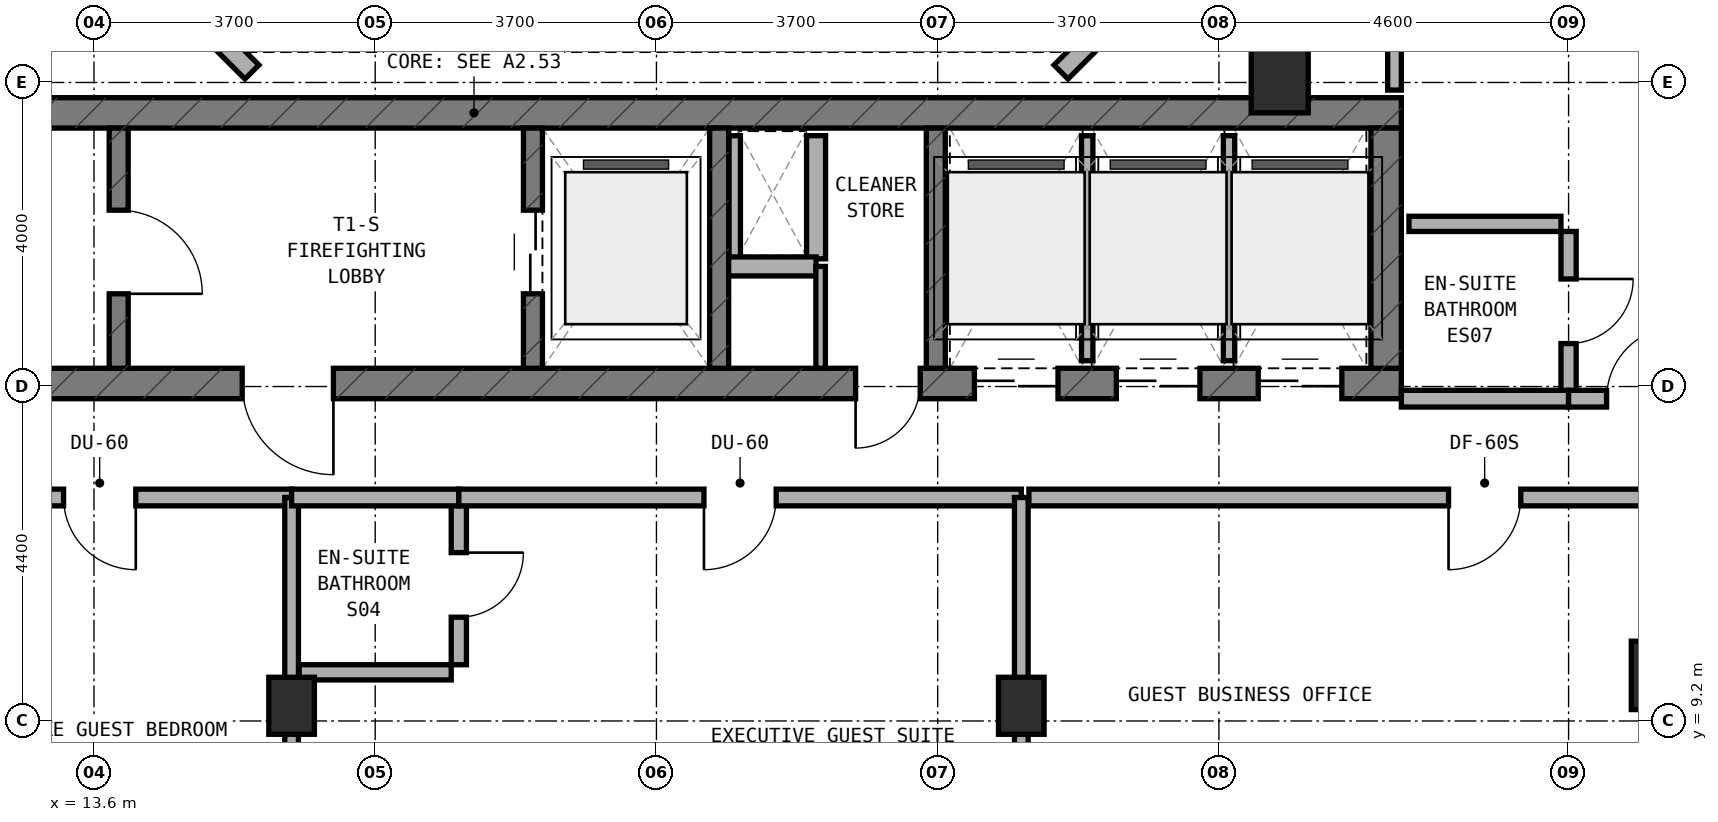
"""IFC4 building model, lengths in metres.
Left out: names, types, materials, properties, quantities, classifications, styles, units other than length and angle.
Written with IfcOpenShell. Run it as: python <this file> out.ifc"""

import sys

from ifc_helpers import new_model, si_unit, direction, frame, frame_2d, origin, origin_2d, place, context, subcontext, project, spatial, rectangle, extrude, element, fill, save


model = new_model("IFC4")
c1 = context("Model", 3, precision=1e-05, world=origin(), true_north=direction((0.0, 1.0)))
c2 = subcontext(c1, "Body", "Model", "MODEL_VIEW")
j1 = project(units=[si_unit("LENGTHUNIT", "METRE"), si_unit("PLANEANGLEUNIT", "RADIAN")], contexts=[c1])
p1 = place(None, origin())
s1 = spatial("IfcSite", under=j1, at=p1, CompositionType="ELEMENT")
p2 = place(p1, origin())
s2 = spatial("IfcBuilding", under=s1, at=p2, CompositionType="ELEMENT")
p3 = place(p2, frame((0.0, 0.0, 246.8)))
s3 = spatial("IfcBuildingStorey", under=s2, at=p3, CompositionType="ELEMENT", Elevation=246.8)
p4 = place(p3, frame((6.4, 13.64, 0.0), z_axis=(0.0, 0.0, 1.0), x_axis=(1.0, 0.0, 0.0)))
e1 = element("IfcWall", 1, at=p4, inside=s3, PredefinedType="SHEAR", context=c2, shape_type="SweptSolid", body=[
    extrude(rectangle(XDim=24.4, YDim=0.4, at=frame_2d((12.2, 0.0))), origin(), (0.0, 0.0, 1.0), 3.6),
])
p5 = place(p4, frame((9.15, 0.0, 0.0)))
e2 = element("IfcOpeningElement", 2, at=p5, cuts=e1, PredefinedType="OPENING", context=c2, shape_type="SweptSolid", body=[
    extrude(rectangle(XDim=1.2, YDim=2.15, at=frame_2d((0.6, 1.075))), frame((0.0, 0.21, 0.0), z_axis=(0.0, -1.0, 0.0), x_axis=(1.0, 0.0, 0.0)), (0.0, 0.0, 1.0), 0.42),
])
p6 = place(p4, frame((17.22, 0.0, 0.0)))
e3 = element("IfcOpeningElement", 3, at=p6, cuts=e1, PredefinedType="OPENING", context=c2, shape_type="SweptSolid", body=[
    extrude(rectangle(XDim=0.85, YDim=2.1, at=frame_2d((0.425, 1.05))), frame((0.0, 0.21, 0.0), z_axis=(0.0, -1.0, 0.0), x_axis=(1.0, 0.0, 0.0)), (0.0, 0.0, 1.0), 0.42),
])
p7 = place(p4, frame((18.783, 0.0, 0.0)))
e4 = element("IfcOpeningElement", 4, at=p7, cuts=e1, PredefinedType="OPENING", context=c2, shape_type="SweptSolid", body=[
    extrude(rectangle(XDim=1.1, YDim=2.15, at=frame_2d((0.55, 1.075))), frame((0.0, 0.21, 0.0), z_axis=(0.0, -1.0, 0.0), x_axis=(1.0, 0.0, 0.0)), (0.0, 0.0, 1.0), 0.42),
])
p8 = place(p4, frame((20.65, 0.0, 0.0)))
e5 = element("IfcOpeningElement", 5, at=p8, cuts=e1, PredefinedType="OPENING", context=c2, shape_type="SweptSolid", body=[
    extrude(rectangle(XDim=1.1, YDim=2.15, at=frame_2d((0.55, 1.075))), frame((0.0, 0.21, 0.0), z_axis=(0.0, -1.0, 0.0), x_axis=(1.0, 0.0, 0.0)), (0.0, 0.0, 1.0), 0.42),
])
p9 = place(p4, frame((22.517, 0.0, 0.0)))
e6 = element("IfcOpeningElement", 6, at=p9, cuts=e1, PredefinedType="OPENING", context=c2, shape_type="SweptSolid", body=[
    extrude(rectangle(XDim=1.1, YDim=2.15, at=frame_2d((0.55, 1.075))), frame((0.0, 0.21, 0.0), z_axis=(0.0, -1.0, 0.0), x_axis=(1.0, 0.0, 0.0)), (0.0, 0.0, 1.0), 0.42),
])
p10 = place(p3, frame((6.4, 17.2, 0.0), z_axis=(0.0, 0.0, 1.0), x_axis=(1.0, 0.0, 0.0)))
e7 = element("IfcWall", 7, at=p10, inside=s3, PredefinedType="SHEAR", context=c2, shape_type="SweptSolid", body=[
    extrude(rectangle(XDim=24.4, YDim=0.4, at=frame_2d((12.2, 0.0))), origin(), (0.0, 0.0, 1.0), 3.6),
])
p11 = place(p3, frame((30.6, 13.84, 0.0), z_axis=(0.0, 0.0, 1.0), x_axis=(0.0, 1.0, 0.0)))
e8 = element("IfcWall", 8, at=p11, inside=s3, PredefinedType="SHEAR", context=c2, shape_type="SweptSolid", body=[
    extrude(rectangle(XDim=3.16, YDim=0.4, at=frame_2d((1.58, 0.0))), origin(), (0.0, 0.0, 1.0), 3.6),
])
p12 = place(p3, frame((13.925, 13.84, 0.0), z_axis=(0.0, 0.0, 1.0), x_axis=(0.0, 1.0, 0.0)))
e9 = element("IfcWall", 9, at=p12, inside=s3, PredefinedType="STANDARD", context=c2, shape_type="SweptSolid", body=[
    extrude(rectangle(XDim=3.16, YDim=0.25, at=frame_2d((1.58, 0.0))), origin(), (0.0, 0.0, 1.0), 3.32),
])
p13 = place(p12, frame((0.98, 0.0, 0.0)))
e10 = element("IfcOpeningElement", 10, at=p13, cuts=e9, PredefinedType="OPENING", context=c2, shape_type="SweptSolid", body=[
    extrude(rectangle(XDim=1.1, YDim=2.15, at=frame_2d((0.55, 1.075))), frame((0.0, 0.135, 0.0), z_axis=(0.0, -1.0, 0.0), x_axis=(1.0, 0.0, 0.0)), (0.0, 0.0, 1.0), 0.27),
])
p14 = place(p3, frame((19.375, 13.84, 0.0), z_axis=(0.0, 0.0, 1.0), x_axis=(0.0, 1.0, 0.0)))
e11 = element("IfcWall", 11, at=p14, inside=s3, PredefinedType="STANDARD", context=c2, shape_type="SweptSolid", body=[
    extrude(rectangle(XDim=3.16, YDim=0.25, at=frame_2d((1.58, 0.0))), origin(), (0.0, 0.0, 1.0), 3.32),
])
p15 = place(p14, frame((0.98, 0.0, 0.0)))
e12 = element("IfcOpeningElement", 12, at=p15, cuts=e11, PredefinedType="OPENING", context=c2, shape_type="SweptSolid", body=[
    extrude(rectangle(XDim=1.1, YDim=2.15, at=frame_2d((0.55, 1.075))), frame((0.0, 0.135, 0.0), z_axis=(0.0, -1.0, 0.0), x_axis=(1.0, 0.0, 0.0)), (0.0, 0.0, 1.0), 0.27),
])
for number, where, z_axis, x_axis in (
    (13, (21.825, 13.84, 0.0), (0.0, 0.0, 1.0), (0.0, 1.0, 0.0)),
    (14, (24.675, 13.84, 0.0), (0.0, 0.0, 1.0), (0.0, 1.0, 0.0)),
):
    element("IfcWall", number, at=place(p3, frame(where, z_axis=z_axis, x_axis=x_axis)), inside=s3, PredefinedType="STANDARD", context=c2, shape_type="SweptSolid", body=[
        extrude(rectangle(XDim=3.16, YDim=0.25, at=frame_2d((1.58, 0.0))), origin(), (0.0, 0.0, 1.0), 3.32),
    ])
for number, where, z_axis, x_axis in (
    (15, (16.2, 9.4, 0.0), (0.0, 0.0, 1.0), (1.0, 0.0, 0.0)),
    (16, (25.8, 9.4, 0.0), (0.0, 0.0, 1.0), (1.0, 0.0, 0.0)),
):
    element("IfcColumn", number, at=place(p3, frame(where, z_axis=z_axis, x_axis=x_axis)), inside=s3, PredefinedType="COLUMN", context=c2, shape_type="SweptSolid", body=[
        extrude(rectangle(XDim=0.6, YDim=0.75, at=origin_2d()), origin(), (0.0, 0.0, 1.0), 3.6),
    ])
for number, where, z_axis, x_axis in (
    (17, (34.2, 9.8, 0.0), (0.0, 0.0, 1.0), (1.0, 0.0, 0.0)),
    (18, (29.2, 17.65, 0.0), (0.0, 0.0, 1.0), (1.0, 0.0, 0.0)),
):
    element("IfcColumn", number, at=place(p3, frame(where, z_axis=z_axis, x_axis=x_axis)), inside=s3, PredefinedType="COLUMN", context=c2, shape_type="SweptSolid", body=[
        extrude(rectangle(XDim=0.75, YDim=0.9, at=origin_2d()), origin(), (0.0, 0.0, 1.0), 3.6),
    ])
for number, where, z_axis, x_axis in (
    (19, (26.322, 17.738, 0.0), (0.0, 0.0, 1.0), (0.707, 0.707, 0.0)),
    (20, (13.844, 19.572, 0.0), (0.0, 0.0, 1.0), (0.707, -0.707, 0.0)),
):
    element("IfcWall", number, at=place(p3, frame(where, z_axis=z_axis, x_axis=x_axis)), inside=s3, PredefinedType="STANDARD", context=c2, shape_type="SweptSolid", body=[
        extrude(rectangle(XDim=2.594, YDim=0.26, at=frame_2d((1.297, 0.0))), origin(), (0.0, 0.0, 1.0), 3.32),
    ])
p16 = place(p3, frame((22.03, 15.28, 0.0), z_axis=(0.0, 0.0, 1.0), x_axis=(0.0, 1.0, 0.0)))
e21 = element("IfcWall", 21, at=p16, inside=s3, PredefinedType="PARTITIONING", context=c2, shape_type="SweptSolid", body=[
    extrude(rectangle(XDim=1.62, YDim=0.15, at=frame_2d((0.81, 0.0))), origin(), (0.0, 0.0, 1.0), 3.32),
])
p17 = place(p3, frame((23.1, 15.28, 0.0), z_axis=(0.0, 0.0, 1.0), x_axis=(0.0, 1.0, 0.0)))
e22 = element("IfcWall", 22, at=p17, inside=s3, PredefinedType="SOLIDWALL", context=c2, shape_type="SweptSolid", body=[
    extrude(rectangle(XDim=1.62, YDim=0.25, at=frame_2d((0.81, 0.0))), origin(), (0.0, 0.0, 1.0), 3.32),
])
p18 = place(p3, frame((21.95, 15.18, 0.0), z_axis=(0.0, 0.0, 1.0), x_axis=(1.0, 0.0, 0.0)))
e23 = element("IfcWall", 23, at=p18, inside=s3, PredefinedType="SOLIDWALL", context=c2, shape_type="SweptSolid", body=[
    extrude(rectangle(XDim=1.15, YDim=0.25, at=frame_2d((0.575, 0.0))), origin(), (0.0, 0.0, 1.0), 3.32),
])
p19 = place(p3, frame((23.16, 13.84, 0.0), z_axis=(0.0, 0.0, 1.0), x_axis=(0.0, 1.0, 0.0)))
e24 = element("IfcWall", 24, at=p19, inside=s3, PredefinedType="PARTITIONING", context=c2, shape_type="SweptSolid", body=[
    extrude(rectangle(XDim=1.34, YDim=0.125, at=frame_2d((0.67, 0.0))), origin(), (0.0, 0.0, 1.0), 3.32),
])
p20 = place(p3, frame((26.667, 13.94, 0.0), z_axis=(0.0, 0.0, 1.0), x_axis=(0.0, 1.0, 0.0)))
e25 = element("IfcWall", 25, at=p20, inside=s3, PredefinedType="PARTITIONING", context=c2, shape_type="SweptSolid", body=[
    extrude(rectangle(XDim=2.96, YDim=0.15, at=frame_2d((1.48, 0.0))), origin(), (0.0, 0.0, 1.0), 3.32),
])
p21 = place(p3, frame((28.533, 13.94, 0.0), z_axis=(0.0, 0.0, 1.0), x_axis=(0.0, 1.0, 0.0)))
e26 = element("IfcWall", 26, at=p21, inside=s3, PredefinedType="PARTITIONING", context=c2, shape_type="SweptSolid", body=[
    extrude(rectangle(XDim=2.96, YDim=0.15, at=frame_2d((1.48, 0.0))), origin(), (0.0, 0.0, 1.0), 2.745),
])
p22 = place(p3, frame((11.15, 12.14, 0.0), z_axis=(0.0, 0.0, 1.0), x_axis=(1.0, 0.0, 0.0)))
e27 = element("IfcWall", 27, at=p22, inside=s3, PredefinedType="SOLIDWALL", context=c2, shape_type="SweptSolid", body=[
    extrude(rectangle(XDim=5.05, YDim=0.22, at=frame_2d((2.525, 0.0))), origin(), (0.0, 0.0, 1.0), 2.745),
])
p23 = place(p22, frame((2.05, 0.0, 0.0)))
e28 = element("IfcOpeningElement", 28, at=p23, cuts=e27, PredefinedType="OPENING", context=c2, shape_type="SweptSolid", body=[
    extrude(rectangle(XDim=0.95, YDim=2.1, at=frame_2d((0.475, 1.05))), frame((0.0, 0.12, 0.0), z_axis=(0.0, -1.0, 0.0), x_axis=(1.0, 0.0, 0.0)), (0.0, 0.0, 1.0), 0.24),
])
p24 = place(p3, frame((16.2, 6.46, 0.0), z_axis=(0.0, 0.0, 1.0), x_axis=(0.0, 1.0, 0.0)))
e29 = element("IfcWall", 29, at=p24, inside=s3, PredefinedType="SOLIDWALL", context=c2, shape_type="SweptSolid", body=[
    extrude(rectangle(XDim=5.68, YDim=0.18, at=frame_2d((2.84, 0.0))), origin(), (0.0, 0.0, 1.0), 2.745),
])
p25 = place(p3, frame((18.4, 9.94, 0.0), z_axis=(0.0, 0.0, 1.0), x_axis=(0.0, 1.0, 0.0)))
e30 = element("IfcWall", 30, at=p25, inside=s3, PredefinedType="PLUMBINGWALL", context=c2, shape_type="SweptSolid", body=[
    extrude(rectangle(XDim=2.1, YDim=0.2, at=frame_2d((1.05, 0.0))), origin(), (0.0, 0.0, 1.0), 3.025),
])
p26 = place(p25, frame((0.625, 0.0, 0.0)))
e31 = element("IfcOpeningElement", 31, at=p26, cuts=e30, PredefinedType="OPENING", context=c2, shape_type="SweptSolid", body=[
    extrude(rectangle(XDim=0.85, YDim=2.1, at=frame_2d((0.425, 1.05))), frame((0.0, 0.11, 0.0), z_axis=(0.0, -1.0, 0.0), x_axis=(1.0, 0.0, 0.0)), (0.0, 0.0, 1.0), 0.22),
])
p27 = place(p3, frame((16.3, 9.84, 0.0), z_axis=(0.0, 0.0, 1.0), x_axis=(1.0, 0.0, 0.0)))
e32 = element("IfcWall", 32, at=p27, inside=s3, PredefinedType="PLUMBINGWALL", context=c2, shape_type="SweptSolid", body=[
    extrude(rectangle(XDim=2.0, YDim=0.2, at=frame_2d((1.0, 0.0))), origin(), (0.0, 0.0, 1.0), 3.32),
])
p28 = place(p3, frame((16.2, 12.14, 0.0), z_axis=(0.0, 0.0, 1.0), x_axis=(1.0, 0.0, 0.0)))
e33 = element("IfcWall", 33, at=p28, inside=s3, PredefinedType="SOLIDWALL", context=c2, shape_type="SweptSolid", body=[
    extrude(rectangle(XDim=2.2, YDim=0.22, at=frame_2d((1.1, 0.0))), origin(), (0.0, 0.0, 1.0), 2.745),
])
p29 = place(p3, frame((18.4, 12.14, 0.0), z_axis=(0.0, 0.0, 1.0), x_axis=(1.0, 0.0, 0.0)))
e34 = element("IfcWall", 34, at=p29, inside=s3, PredefinedType="SOLIDWALL", context=c2, shape_type="SweptSolid", body=[
    extrude(rectangle(XDim=7.4, YDim=0.22, at=frame_2d((3.7, 0.0))), origin(), (0.0, 0.0, 1.0), 2.745),
])
p30 = place(p29, frame((3.225, 0.0, 0.0)))
e35 = element("IfcOpeningElement", 35, at=p30, cuts=e34, PredefinedType="OPENING", context=c2, shape_type="SweptSolid", body=[
    extrude(rectangle(XDim=0.95, YDim=2.1, at=frame_2d((0.475, 1.05))), frame((0.0, 0.12, 0.0), z_axis=(0.0, -1.0, 0.0), x_axis=(1.0, 0.0, 0.0)), (0.0, 0.0, 1.0), 0.24),
])
p31 = place(p3, frame((25.8, 6.46, 0.0), z_axis=(0.0, 0.0, 1.0), x_axis=(0.0, 1.0, 0.0)))
e36 = element("IfcWall", 36, at=p31, inside=s3, PredefinedType="SOLIDWALL", context=c2, shape_type="SweptSolid", body=[
    extrude(rectangle(XDim=5.68, YDim=0.18, at=frame_2d((2.84, 0.0))), origin(), (0.0, 0.0, 1.0), 2.745),
])
p32 = place(p3, frame((25.9, 12.14, 0.0), z_axis=(0.0, 0.0, 1.0), x_axis=(1.0, 0.0, 0.0)))
e37 = element("IfcWall", 37, at=p32, inside=s3, PredefinedType="SOLIDWALL", context=c2, shape_type="SweptSolid", body=[
    extrude(rectangle(XDim=13.24, YDim=0.22, at=frame_2d((6.62, 0.0))), origin(), (0.0, 0.0, 1.0), 2.745),
])
p33 = place(p32, frame((5.521, 0.0, 0.0)))
e38 = element("IfcOpeningElement", 38, at=p33, cuts=e37, PredefinedType="OPENING", context=c2, shape_type="SweptSolid", body=[
    extrude(rectangle(XDim=0.95, YDim=2.1, at=frame_2d((0.475, 1.05))), frame((0.0, 0.12, 0.0), z_axis=(0.0, -1.0, 0.0), x_axis=(1.0, 0.0, 0.0)), (0.0, 0.0, 1.0), 0.24),
])
p34 = place(p3, frame((30.71, 17.5, 0.0), z_axis=(0.0, 0.0, 1.0), x_axis=(0.0, 1.0, 0.0)))
e39 = element("IfcWall", 39, at=p34, inside=s3, PredefinedType="SOLIDWALL", context=c2, shape_type="SweptSolid", body=[
    extrude(rectangle(XDim=15.0, YDim=0.18, at=frame_2d((7.5, 0.0))), origin(), (0.0, 0.0, 1.0), 2.745),
])
p35 = place(p3, frame((33.0, 13.54, 0.0), z_axis=(0.0, 0.0, 1.0), x_axis=(0.0, 1.0, 0.0)))
e40 = element("IfcWall", 40, at=p35, inside=s3, PredefinedType="PLUMBINGWALL", context=c2, shape_type="SweptSolid", body=[
    extrude(rectangle(XDim=2.1, YDim=0.2, at=frame_2d((1.05, 0.0))), origin(), (0.0, 0.0, 1.0), 3.32),
])
p36 = place(p35, frame((0.625, 0.0, 0.0)))
e41 = element("IfcOpeningElement", 41, at=p36, cuts=e40, PredefinedType="OPENING", context=c2, shape_type="SweptSolid", body=[
    extrude(rectangle(XDim=0.85, YDim=2.1, at=frame_2d((0.425, 1.05))), frame((0.0, 0.11, 0.0), z_axis=(0.0, -1.0, 0.0), x_axis=(1.0, 0.0, 0.0)), (0.0, 0.0, 1.0), 0.22),
])
p37 = place(p3, frame((30.9, 15.74, 0.0), z_axis=(0.0, 0.0, 1.0), x_axis=(1.0, 0.0, 0.0)))
e42 = element("IfcWall", 42, at=p37, inside=s3, PredefinedType="PLUMBINGWALL", context=c2, shape_type="SweptSolid", body=[
    extrude(rectangle(XDim=2.0, YDim=0.2, at=frame_2d((1.0, 0.0))), origin(), (0.0, 0.0, 1.0), 3.32),
])
p38 = place(p3, frame((30.8, 13.44, 0.0), z_axis=(0.0, 0.0, 1.0), x_axis=(1.0, 0.0, 0.0)))
e43 = element("IfcWall", 43, at=p38, inside=s3, PredefinedType="SOLIDWALL", context=c2, shape_type="SweptSolid", body=[
    extrude(rectangle(XDim=2.2, YDim=0.22, at=frame_2d((1.1, 0.0))), origin(), (0.0, 0.0, 1.0), 3.32),
])
p39 = place(p3, frame((33.0, 13.44, 0.0), z_axis=(0.0, 0.0, 1.0), x_axis=(1.0, 0.0, 0.0)))
e44 = element("IfcWall", 44, at=p39, inside=s3, PredefinedType="SOLIDWALL", context=c2, shape_type="SweptSolid", body=[
    extrude(rectangle(XDim=6.4, YDim=0.22, at=frame_2d((3.2, 0.0))), origin(), (0.0, 0.0, 1.0), 2.745),
])
p40 = place(p39, frame((0.5, 0.0, 0.0)))
e45 = element("IfcOpeningElement", 45, at=p40, cuts=e44, PredefinedType="OPENING", context=c2, shape_type="SweptSolid", body=[
    extrude(rectangle(XDim=0.95, YDim=2.1, at=frame_2d((0.475, 1.05))), frame((0.0, 0.12, 0.0), z_axis=(0.0, -1.0, 0.0), x_axis=(1.0, 0.0, 0.0)), (0.0, 0.0, 1.0), 0.24),
])
p41 = place(p13, frame((1.1, 0.0, 0.0), z_axis=(0.0, 0.0, 1.0), x_axis=(-1.0, 0.0, 0.0)))
e46 = element("IfcDoor", 46, at=p41, inside=s3, OperationType="SINGLE_SWING_RIGHT", PredefinedType="DOOR", context=c2, shape_type="SweptSolid", body=[
    extrude(rectangle(XDim=1.1, YDim=2.15, at=frame_2d((0.55, 1.075))), frame((0.0, 0.025, 0.0), z_axis=(0.0, -1.0, 0.0), x_axis=(1.0, 0.0, 0.0)), (0.0, 0.0, 1.0), 0.05),
])
fill(e10, e46)
p42 = place(p5, frame((1.2, 0.0, 0.0), z_axis=(0.0, 0.0, 1.0), x_axis=(-1.0, 0.0, 0.0)))
e47 = element("IfcDoor", 47, at=p42, inside=s3, OperationType="SINGLE_SWING_LEFT", PredefinedType="DOOR", context=c2, shape_type="SweptSolid", body=[
    extrude(rectangle(XDim=1.2, YDim=2.15, at=frame_2d((0.6, 1.075))), frame((0.0, 0.025, 0.0), z_axis=(0.0, -1.0, 0.0), x_axis=(1.0, 0.0, 0.0)), (0.0, 0.0, 1.0), 0.05),
])
fill(e2, e47)
p43 = place(p15, origin())
e48 = element("IfcDoor", 48, at=p43, inside=s3, OperationType="DOUBLE_DOOR_SLIDING", PredefinedType="DOOR", context=c2, shape_type="SweptSolid", body=[
    extrude(rectangle(XDim=1.1, YDim=2.15, at=frame_2d((0.55, 1.075))), frame((0.0, 0.025, 0.0), z_axis=(0.0, -1.0, 0.0), x_axis=(1.0, 0.0, 0.0)), (0.0, 0.0, 1.0), 0.05),
])
fill(e12, e48)
p44 = place(p6, frame((0.85, 0.0, 0.0), z_axis=(0.0, 0.0, 1.0), x_axis=(-1.0, 0.0, 0.0)))
e49 = element("IfcDoor", 49, at=p44, inside=s3, OperationType="SINGLE_SWING_RIGHT", PredefinedType="DOOR", context=c2, shape_type="SweptSolid", body=[
    extrude(rectangle(XDim=0.85, YDim=2.1, at=frame_2d((0.425, 1.05))), frame((0.0, 0.025, 0.0), z_axis=(0.0, -1.0, 0.0), x_axis=(1.0, 0.0, 0.0)), (0.0, 0.0, 1.0), 0.05),
])
fill(e3, e49)
p45 = place(p7, frame((1.1, 0.0, 0.0), z_axis=(0.0, 0.0, 1.0), x_axis=(-1.0, 0.0, 0.0)))
e50 = element("IfcDoor", 50, at=p45, inside=s3, OperationType="DOUBLE_DOOR_SLIDING", PredefinedType="DOOR", context=c2, shape_type="SweptSolid", body=[
    extrude(rectangle(XDim=1.1, YDim=2.15, at=frame_2d((0.55, 1.075))), frame((0.0, 0.025, 0.0), z_axis=(0.0, -1.0, 0.0), x_axis=(1.0, 0.0, 0.0)), (0.0, 0.0, 1.0), 0.05),
])
fill(e4, e50)
p46 = place(p8, frame((1.1, 0.0, 0.0), z_axis=(0.0, 0.0, 1.0), x_axis=(-1.0, 0.0, 0.0)))
e51 = element("IfcDoor", 51, at=p46, inside=s3, OperationType="DOUBLE_DOOR_SLIDING", PredefinedType="DOOR", context=c2, shape_type="SweptSolid", body=[
    extrude(rectangle(XDim=1.1, YDim=2.15, at=frame_2d((0.55, 1.075))), frame((0.0, 0.025, 0.0), z_axis=(0.0, -1.0, 0.0), x_axis=(1.0, 0.0, 0.0)), (0.0, 0.0, 1.0), 0.05),
])
fill(e5, e51)
p47 = place(p9, frame((1.1, 0.0, 0.0), z_axis=(0.0, 0.0, 1.0), x_axis=(-1.0, 0.0, 0.0)))
e52 = element("IfcDoor", 52, at=p47, inside=s3, OperationType="DOUBLE_DOOR_SLIDING", PredefinedType="DOOR", context=c2, shape_type="SweptSolid", body=[
    extrude(rectangle(XDim=1.1, YDim=2.15, at=frame_2d((0.55, 1.075))), frame((0.0, 0.025, 0.0), z_axis=(0.0, -1.0, 0.0), x_axis=(1.0, 0.0, 0.0)), (0.0, 0.0, 1.0), 0.05),
])
fill(e6, e52)
p48 = place(p23, frame((0.95, 0.0, 0.0), z_axis=(0.0, 0.0, 1.0), x_axis=(-1.0, 0.0, 0.0)))
e53 = element("IfcDoor", 53, at=p48, inside=s3, OperationType="SINGLE_SWING_LEFT", PredefinedType="DOOR", context=c2, shape_type="SweptSolid", body=[
    extrude(rectangle(XDim=0.95, YDim=2.1, at=frame_2d((0.475, 1.05))), frame((0.0, 0.025, 0.0), z_axis=(0.0, -1.0, 0.0), x_axis=(1.0, 0.0, 0.0)), (0.0, 0.0, 1.0), 0.05),
])
fill(e28, e53)
p49 = place(p26, frame((0.85, 0.0, 0.0), z_axis=(0.0, 0.0, 1.0), x_axis=(-1.0, 0.0, 0.0)))
e54 = element("IfcDoor", 54, at=p49, inside=s3, OperationType="SINGLE_SWING_LEFT", PredefinedType="DOOR", context=c2, shape_type="SweptSolid", body=[
    extrude(rectangle(XDim=0.85, YDim=2.1, at=frame_2d((0.425, 1.05))), frame((0.0, 0.025, 0.0), z_axis=(0.0, -1.0, 0.0), x_axis=(1.0, 0.0, 0.0)), (0.0, 0.0, 1.0), 0.05),
])
fill(e31, e54)
p50 = place(p30, frame((0.95, 0.0, 0.0), z_axis=(0.0, 0.0, 1.0), x_axis=(-1.0, 0.0, 0.0)))
e55 = element("IfcDoor", 55, at=p50, inside=s3, OperationType="SINGLE_SWING_RIGHT", PredefinedType="DOOR", context=c2, shape_type="SweptSolid", body=[
    extrude(rectangle(XDim=0.95, YDim=2.1, at=frame_2d((0.475, 1.05))), frame((0.0, 0.025, 0.0), z_axis=(0.0, -1.0, 0.0), x_axis=(1.0, 0.0, 0.0)), (0.0, 0.0, 1.0), 0.05),
])
fill(e35, e55)
p51 = place(p33, frame((0.95, 0.0, 0.0), z_axis=(0.0, 0.0, 1.0), x_axis=(-1.0, 0.0, 0.0)))
e56 = element("IfcDoor", 56, at=p51, inside=s3, OperationType="SINGLE_SWING_RIGHT", PredefinedType="DOOR", context=c2, shape_type="SweptSolid", body=[
    extrude(rectangle(XDim=0.95, YDim=2.1, at=frame_2d((0.475, 1.05))), frame((0.0, 0.025, 0.0), z_axis=(0.0, -1.0, 0.0), x_axis=(1.0, 0.0, 0.0)), (0.0, 0.0, 1.0), 0.05),
])
fill(e38, e56)
p52 = place(p36, frame((0.85, 0.0, 0.0), z_axis=(0.0, 0.0, 1.0), x_axis=(-1.0, 0.0, 0.0)))
e57 = element("IfcDoor", 57, at=p52, inside=s3, OperationType="SINGLE_SWING_LEFT", PredefinedType="DOOR", context=c2, shape_type="SweptSolid", body=[
    extrude(rectangle(XDim=0.85, YDim=2.1, at=frame_2d((0.425, 1.05))), frame((0.0, 0.025, 0.0), z_axis=(0.0, -1.0, 0.0), x_axis=(1.0, 0.0, 0.0)), (0.0, 0.0, 1.0), 0.05),
])
fill(e41, e57)
p53 = place(p40, origin())
e58 = element("IfcDoor", 58, at=p53, inside=s3, OperationType="SINGLE_SWING_RIGHT", PredefinedType="DOOR", context=c2, shape_type="SweptSolid", body=[
    extrude(rectangle(XDim=0.95, YDim=2.1, at=frame_2d((0.475, 1.05))), frame((0.0, 0.025, 0.0), z_axis=(0.0, -1.0, 0.0), x_axis=(1.0, 0.0, 0.0)), (0.0, 0.0, 1.0), 0.05),
])
fill(e45, e58)
save(model, sys.argv[1])
